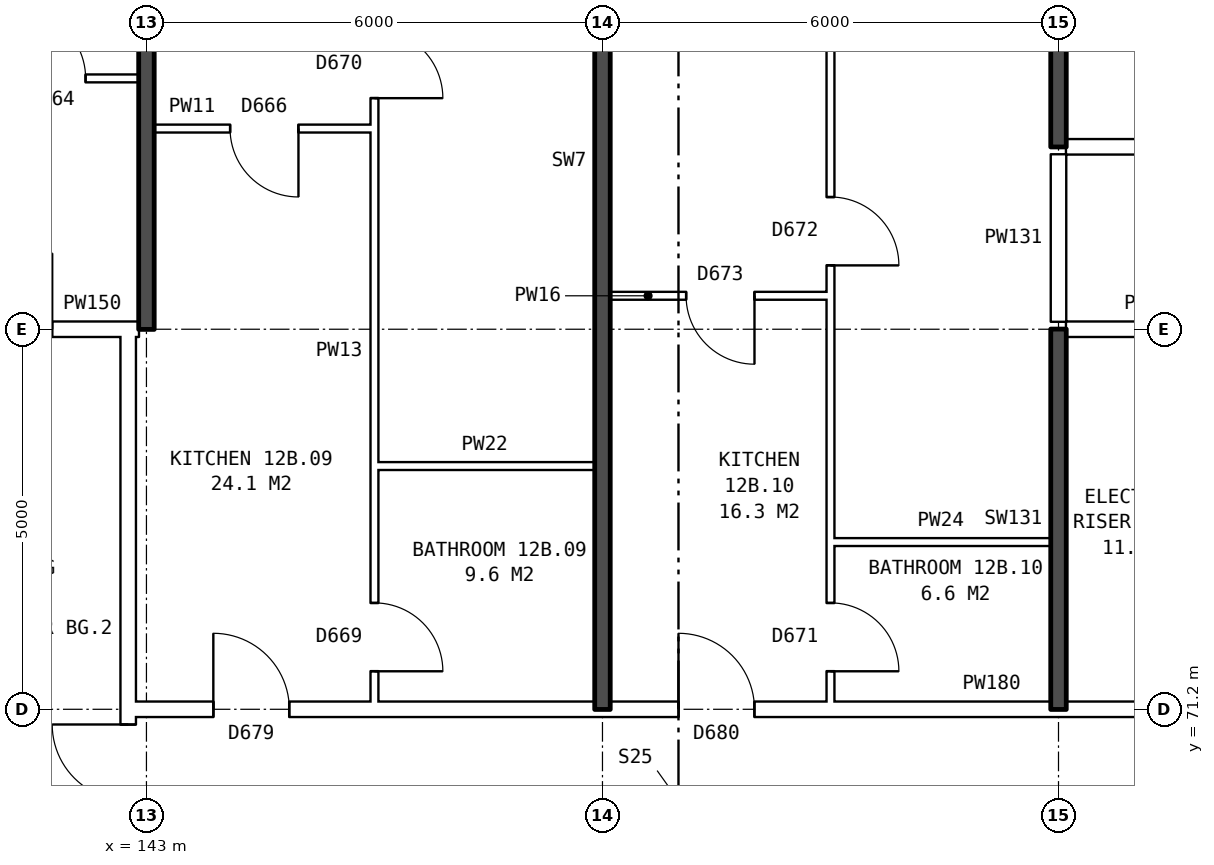
"""IFC4 building model, lengths in metres.
Left out: names, types, materials, properties, quantities, classifications, styles, units other than length and angle.
Written with IfcOpenShell. Run it as: python <this file> out.ifc"""

import sys

from ifc_helpers import new_model, si_unit, direction, frame, frame_2d, origin, place, context, subcontext, project, spatial, rectangle, extrude, element, fill, save


model = new_model("IFC4")
c1 = context("Model", 3, precision=1e-05, world=origin(), true_north=direction((0.0, 1.0)))
c2 = subcontext(c1, "Body", "Model", "MODEL_VIEW")
j1 = project(units=[si_unit("LENGTHUNIT", "METRE"), si_unit("PLANEANGLEUNIT", "RADIAN")], contexts=[c1])
p1 = place(None, origin())
s1 = spatial("IfcSite", under=j1, at=p1, CompositionType="ELEMENT")
p2 = place(p1, origin())
s2 = spatial("IfcBuilding", under=s1, at=p2, CompositionType="ELEMENT")
p3 = place(p2, frame((0.0, 0.0, 47.4)))
s3 = spatial("IfcBuildingStorey", under=s2, at=p3, CompositionType="ELEMENT", Elevation=47.4)
p4 = place(p3, frame((142.76, 63.9, 0.0), z_axis=(0.0, 0.0, 1.0), x_axis=(0.0, 1.0, 0.0)))
e1 = element("IfcWall", 1, at=p4, inside=s3, PredefinedType="PARTITIONING", context=c2, shape_type="SweptSolid", body=[
    extrude(rectangle(XDim=12.2, YDim=0.2, at=frame_2d((6.1, 0.0))), origin(), (0.0, 0.0, 1.0), 2.85),
])
p5 = place(p4, frame((5.1, 0.0, 0.0)))
e2 = element("IfcOpeningElement", 2, at=p5, cuts=e1, PredefinedType="OPENING", context=c2, shape_type="SweptSolid", body=[
    extrude(rectangle(XDim=2.0, YDim=2.1, at=frame_2d((1.0, 1.05))), frame((0.0, 0.11, 0.0), z_axis=(0.0, -1.0, 0.0), x_axis=(1.0, 0.0, 0.0)), (0.0, 0.0, 1.0), 0.22),
])
p6 = place(p3, frame((142.76, 71.2, 0.0), z_axis=(0.0, 0.0, 1.0), x_axis=(1.0, 0.0, 0.0)))
e3 = element("IfcWall", 3, at=p6, inside=s3, PredefinedType="PARTITIONING", context=c2, shape_type="SweptSolid", body=[
    extrude(rectangle(XDim=14.48, YDim=0.2, at=frame_2d((7.24, 0.0))), origin(), (0.0, 0.0, 1.0), 2.85),
])
p7 = place(p6, frame((1.12, 0.0, 0.0)))
e4 = element("IfcOpeningElement", 4, at=p7, cuts=e3, PredefinedType="OPENING", context=c2, shape_type="SweptSolid", body=[
    extrude(rectangle(XDim=1.0, YDim=2.1, at=frame_2d((0.5, 1.05))), frame((0.0, 0.11, 0.0), z_axis=(0.0, -1.0, 0.0), x_axis=(1.0, 0.0, 0.0)), (0.0, 0.0, 1.0), 0.22),
])
p8 = place(p6, frame((7.24, 0.0, 0.0)))
e5 = element("IfcOpeningElement", 5, at=p8, cuts=e3, PredefinedType="OPENING", context=c2, shape_type="SweptSolid", body=[
    extrude(rectangle(XDim=1.0, YDim=2.1, at=frame_2d((0.5, 1.05))), frame((0.0, 0.11, 0.0), z_axis=(0.0, -1.0, 0.0), x_axis=(1.0, 0.0, 0.0)), (0.0, 0.0, 1.0), 0.22),
])
for number, where, z_axis, x_axis in (
    (6, (152.0, 73.4, 0.0), (0.0, 0.0, 1.0), (1.0, 0.0, 0.0)),
    (7, (146.0, 74.4, 0.0), (0.0, 0.0, 1.0), (1.0, 0.0, 0.0)),
):
    element("IfcWall", number, at=place(p3, frame(where, z_axis=z_axis, x_axis=x_axis)), inside=s3, PredefinedType="PARTITIONING", context=c2, shape_type="SweptSolid", body=[
        extrude(rectangle(XDim=2.9, YDim=0.1, at=frame_2d((1.45, 0.0))), origin(), (0.0, 0.0, 1.0), 2.85),
    ])
p9 = place(p3, frame((139.76, 76.2, 0.0), z_axis=(0.0, 0.0, 1.0), x_axis=(1.0, 0.0, 0.0)))
e8 = element("IfcWall", 8, at=p9, inside=s3, PredefinedType="PARTITIONING", context=c2, shape_type="SweptSolid", body=[
    extrude(rectangle(XDim=3.0, YDim=0.2, at=frame_2d((1.5, 0.0))), origin(), (0.0, 0.0, 1.0), 2.85),
])
p10 = place(p9, frame((1.0, 0.0, 0.0)))
e9 = element("IfcOpeningElement", 9, at=p10, cuts=e8, PredefinedType="OPENING", context=c2, shape_type="SweptSolid", body=[
    extrude(rectangle(XDim=1.0, YDim=2.1, at=frame_2d((0.5, 1.05))), frame((0.0, 0.11, 0.0), z_axis=(0.0, -1.0, 0.0), x_axis=(1.0, 0.0, 0.0)), (0.0, 0.0, 1.0), 0.22),
])
p11 = place(p3, frame((142.76, 76.2, 0.0), z_axis=(0.0, 0.0, 1.0), x_axis=(1.0, 0.0, 0.0)))
e10 = element("IfcWall", 10, at=p11, inside=s3, PredefinedType="PARTITIONING", context=c2, shape_type="SweptSolid", body=[
    extrude(rectangle(XDim=0.14, YDim=0.2, at=frame_2d((0.07, 0.0))), origin(), (0.0, 0.0, 1.0), 2.85),
])
p12 = place(p3, frame((155.1, 76.2, 0.0), z_axis=(0.0, 0.0, 1.0), x_axis=(1.0, 0.0, 0.0)))
e11 = element("IfcWall", 11, at=p12, inside=s3, PredefinedType="PARTITIONING", context=c2, shape_type="SweptSolid", body=[
    extrude(rectangle(XDim=2.14, YDim=0.2, at=frame_2d((1.07, 0.0))), origin(), (0.0, 0.0, 1.0), 2.85),
])
p13 = place(p3, frame((149.1, 76.64, 0.0), z_axis=(0.0, 0.0, 1.0), x_axis=(1.0, 0.0, 0.0)))
e12 = element("IfcWall", 12, at=p13, inside=s3, PredefinedType="PARTITIONING", context=c2, shape_type="SweptSolid", body=[
    extrude(rectangle(XDim=2.9, YDim=0.1, at=frame_2d((1.45, 0.0))), origin(), (0.0, 0.0, 1.0), 2.85),
])
p14 = place(p13, frame((1.0, 0.0, 0.0)))
e13 = element("IfcOpeningElement", 13, at=p14, cuts=e12, PredefinedType="OPENING", context=c2, shape_type="SweptSolid", body=[
    extrude(rectangle(XDim=0.9, YDim=2.1, at=frame_2d((0.45, 1.05))), frame((0.0, 0.06, 0.0), z_axis=(0.0, -1.0, 0.0), x_axis=(1.0, 0.0, 0.0)), (0.0, 0.0, 1.0), 0.12),
])
p15 = place(p3, frame((155.1, 78.6, 0.0), z_axis=(0.0, 0.0, 1.0), x_axis=(1.0, 0.0, 0.0)))
e14 = element("IfcWall", 14, at=p15, inside=s3, PredefinedType="PARTITIONING", context=c2, shape_type="SweptSolid", body=[
    extrude(rectangle(XDim=21.04, YDim=0.2, at=frame_2d((10.52, 0.0))), origin(), (0.0, 0.0, 1.0), 2.85),
])
p16 = place(p15, frame((2.45, 0.0, 0.0)))
e15 = element("IfcOpeningElement", 15, at=p16, cuts=e14, PredefinedType="OPENING", context=c2, shape_type="SweptSolid", body=[
    extrude(rectangle(XDim=1.0, YDim=2.1, at=frame_2d((0.5, 1.05))), frame((0.0, 0.11, 0.0), z_axis=(0.0, -1.0, 0.0), x_axis=(1.0, 0.0, 0.0)), (0.0, 0.0, 1.0), 0.22),
])
p17 = place(p15, frame((14.4, 0.0, 0.0)))
e16 = element("IfcOpeningElement", 16, at=p17, cuts=e14, PredefinedType="OPENING", context=c2, shape_type="SweptSolid", body=[
    extrude(rectangle(XDim=1.0, YDim=2.1, at=frame_2d((0.5, 1.05))), frame((0.0, 0.11, 0.0), z_axis=(0.0, -1.0, 0.0), x_axis=(1.0, 0.0, 0.0)), (0.0, 0.0, 1.0), 0.22),
])
p18 = place(p3, frame((143.1, 78.84, 0.0), z_axis=(0.0, 0.0, 1.0), x_axis=(1.0, 0.0, 0.0)))
e17 = element("IfcWall", 17, at=p18, inside=s3, PredefinedType="PARTITIONING", context=c2, shape_type="SweptSolid", body=[
    extrude(rectangle(XDim=2.9, YDim=0.1, at=frame_2d((1.45, 0.0))), origin(), (0.0, 0.0, 1.0), 2.85),
])
p19 = place(p18, frame((1.0, 0.0, 0.0)))
e18 = element("IfcOpeningElement", 18, at=p19, cuts=e17, PredefinedType="OPENING", context=c2, shape_type="SweptSolid", body=[
    extrude(rectangle(XDim=0.9, YDim=2.1, at=frame_2d((0.45, 1.05))), frame((0.0, 0.06, 0.0), z_axis=(0.0, -1.0, 0.0), x_axis=(1.0, 0.0, 0.0)), (0.0, 0.0, 1.0), 0.12),
])
p20 = place(p3, frame((137.1, 79.5, 0.0), z_axis=(0.0, 0.0, 1.0), x_axis=(1.0, 0.0, 0.0)))
e19 = element("IfcWall", 19, at=p20, inside=s3, PredefinedType="PARTITIONING", context=c2, shape_type="SweptSolid", body=[
    extrude(rectangle(XDim=5.8, YDim=0.1, at=frame_2d((2.9, 0.0))), origin(), (0.0, 0.0, 1.0), 2.85),
])
p21 = place(p20, frame((1.3, 0.0, 0.0)))
e20 = element("IfcOpeningElement", 20, at=p21, cuts=e19, PredefinedType="OPENING", context=c2, shape_type="SweptSolid", body=[
    extrude(rectangle(XDim=0.9, YDim=2.1, at=frame_2d((0.45, 1.05))), frame((0.0, 0.06, 0.0), z_axis=(0.0, -1.0, 0.0), x_axis=(1.0, 0.0, 0.0)), (0.0, 0.0, 1.0), 0.12),
])
p22 = place(p20, frame((4.2, 0.0, 0.0)))
e21 = element("IfcOpeningElement", 21, at=p22, cuts=e19, PredefinedType="OPENING", context=c2, shape_type="SweptSolid", body=[
    extrude(rectangle(XDim=0.9, YDim=2.1, at=frame_2d((0.45, 1.05))), frame((0.0, 0.06, 0.0), z_axis=(0.0, -1.0, 0.0), x_axis=(1.0, 0.0, 0.0)), (0.0, 0.0, 1.0), 0.12),
])
p23 = place(p3, frame((143.0, 76.2, 0.0), z_axis=(0.0, 0.0, 1.0), x_axis=(0.0, 1.0, 0.0)))
e22 = element("IfcWall", 22, at=p23, inside=s3, PredefinedType="SOLIDWALL", context=c2, shape_type="SweptSolid", body=[
    extrude(rectangle(XDim=9.44, YDim=0.2, at=frame_2d((4.72, 0.0))), origin(), (0.0, 0.0, 1.0), 2.85),
])
p24 = place(p3, frame((146.0, 71.3, 0.0), z_axis=(0.0, 0.0, 1.0), x_axis=(0.0, 1.0, 0.0)))
e23 = element("IfcWall", 23, at=p24, inside=s3, PredefinedType="PARTITIONING", context=c2, shape_type="SweptSolid", body=[
    extrude(rectangle(XDim=14.34, YDim=0.1, at=frame_2d((7.17, 0.0))), origin(), (0.0, 0.0, 1.0), 2.85),
])
p25 = place(p24, frame((7.94, 0.0, 0.0)))
e24 = element("IfcOpeningElement", 24, at=p25, cuts=e23, PredefinedType="OPENING", context=c2, shape_type="SweptSolid", body=[
    extrude(rectangle(XDim=0.9, YDim=2.1, at=frame_2d((0.45, 1.05))), frame((0.0, 0.06, 0.0), z_axis=(0.0, -1.0, 0.0), x_axis=(1.0, 0.0, 0.0)), (0.0, 0.0, 1.0), 0.12),
])
p26 = place(p24, frame((0.4, 0.0, 0.0)))
e25 = element("IfcOpeningElement", 25, at=p26, cuts=e23, PredefinedType="OPENING", context=c2, shape_type="SweptSolid", body=[
    extrude(rectangle(XDim=0.9, YDim=2.1, at=frame_2d((0.45, 1.05))), frame((0.0, 0.06, 0.0), z_axis=(0.0, -1.0, 0.0), x_axis=(1.0, 0.0, 0.0)), (0.0, 0.0, 1.0), 0.12),
])
p27 = place(p3, frame((149.0, 71.2, 0.0), z_axis=(0.0, 0.0, 1.0), x_axis=(0.0, 1.0, 0.0)))
e26 = element("IfcWall", 26, at=p27, inside=s3, PredefinedType="SOLIDWALL", context=c2, shape_type="SweptSolid", body=[
    extrude(rectangle(XDim=14.44, YDim=0.2, at=frame_2d((7.22, 0.0))), origin(), (0.0, 0.0, 1.0), 2.85),
])
p28 = place(p3, frame((152.0, 71.3, 0.0), z_axis=(0.0, 0.0, 1.0), x_axis=(0.0, 1.0, 0.0)))
e27 = element("IfcWall", 27, at=p28, inside=s3, PredefinedType="PARTITIONING", context=c2, shape_type="SweptSolid", body=[
    extrude(rectangle(XDim=14.34, YDim=0.1, at=frame_2d((7.17, 0.0))), origin(), (0.0, 0.0, 1.0), 2.85),
])
p29 = place(p28, frame((5.74, 0.0, 0.0)))
e28 = element("IfcOpeningElement", 28, at=p29, cuts=e27, PredefinedType="OPENING", context=c2, shape_type="SweptSolid", body=[
    extrude(rectangle(XDim=0.9, YDim=2.1, at=frame_2d((0.45, 1.05))), frame((0.0, 0.06, 0.0), z_axis=(0.0, -1.0, 0.0), x_axis=(1.0, 0.0, 0.0)), (0.0, 0.0, 1.0), 0.12),
])
p30 = place(p28, frame((0.4, 0.0, 0.0)))
e29 = element("IfcOpeningElement", 29, at=p30, cuts=e27, PredefinedType="OPENING", context=c2, shape_type="SweptSolid", body=[
    extrude(rectangle(XDim=0.9, YDim=2.1, at=frame_2d((0.45, 1.05))), frame((0.0, 0.06, 0.0), z_axis=(0.0, -1.0, 0.0), x_axis=(1.0, 0.0, 0.0)), (0.0, 0.0, 1.0), 0.12),
])
p31 = place(p3, frame((155.0, 71.2, 0.0), z_axis=(0.0, 0.0, 1.0), x_axis=(0.0, 1.0, 0.0)))
e30 = element("IfcWall", 30, at=p31, inside=s3, PredefinedType="SOLIDWALL", context=c2, shape_type="SweptSolid", body=[
    extrude(rectangle(XDim=5.0, YDim=0.2, at=frame_2d((2.5, 0.0))), origin(), (0.0, 0.0, 1.0), 2.85),
])
p32 = place(p3, frame((155.0, 76.3, 0.0), z_axis=(0.0, 0.0, 1.0), x_axis=(0.0, 1.0, 0.0)))
e31 = element("IfcWall", 31, at=p32, inside=s3, PredefinedType="PARTITIONING", context=c2, shape_type="SweptSolid", body=[
    extrude(rectangle(XDim=2.2, YDim=0.2, at=frame_2d((1.1, 0.0))), origin(), (0.0, 0.0, 1.0), 2.85),
])
p33 = place(p3, frame((155.0, 78.6, 0.0), z_axis=(0.0, 0.0, 1.0), x_axis=(0.0, 1.0, 0.0)))
e32 = element("IfcWall", 32, at=p33, inside=s3, PredefinedType="SOLIDWALL", context=c2, shape_type="SweptSolid", body=[
    extrude(rectangle(XDim=7.04, YDim=0.2, at=frame_2d((3.52, 0.0))), origin(), (0.0, 0.0, 1.0), 2.85),
])
p34 = place(p5, origin())
e33 = element("IfcDoor", 33, at=p34, inside=s3, OperationType="DOUBLE_DOOR_SINGLE_SWING", PredefinedType="DOOR", context=c2, shape_type="SweptSolid", body=[
    extrude(rectangle(XDim=2.0, YDim=2.1, at=frame_2d((1.0, 1.05))), frame((0.0, 0.025, 0.0), z_axis=(0.0, -1.0, 0.0), x_axis=(1.0, 0.0, 0.0)), (0.0, 0.0, 1.0), 0.05),
])
fill(e2, e33)
p35 = place(p22, origin())
e34 = element("IfcDoor", 34, at=p35, inside=s3, OperationType="SINGLE_SWING_LEFT", PredefinedType="DOOR", context=c2, shape_type="SweptSolid", body=[
    extrude(rectangle(XDim=0.9, YDim=2.1, at=frame_2d((0.45, 1.05))), frame((0.0, 0.025, 0.0), z_axis=(0.0, -1.0, 0.0), x_axis=(1.0, 0.0, 0.0)), (0.0, 0.0, 1.0), 0.05),
])
fill(e21, e34)
p36 = place(p25, frame((0.9, 0.0, 0.0), z_axis=(0.0, 0.0, 1.0), x_axis=(-1.0, 0.0, 0.0)))
e35 = element("IfcDoor", 35, at=p36, inside=s3, OperationType="SINGLE_SWING_RIGHT", PredefinedType="DOOR", context=c2, shape_type="SweptSolid", body=[
    extrude(rectangle(XDim=0.9, YDim=2.1, at=frame_2d((0.45, 1.05))), frame((0.0, 0.025, 0.0), z_axis=(0.0, -1.0, 0.0), x_axis=(1.0, 0.0, 0.0)), (0.0, 0.0, 1.0), 0.05),
])
fill(e24, e35)
p37 = place(p7, origin())
e36 = element("IfcDoor", 36, at=p37, inside=s3, OperationType="SINGLE_SWING_LEFT", PredefinedType="DOOR", context=c2, shape_type="SweptSolid", body=[
    extrude(rectangle(XDim=1.0, YDim=2.1, at=frame_2d((0.5, 1.05))), frame((0.0, 0.025, 0.0), z_axis=(0.0, -1.0, 0.0), x_axis=(1.0, 0.0, 0.0)), (0.0, 0.0, 1.0), 0.05),
])
fill(e4, e36)
p38 = place(p19, frame((0.9, 0.0, 0.0), z_axis=(0.0, 0.0, 1.0), x_axis=(-1.0, 0.0, 0.0)))
e37 = element("IfcDoor", 37, at=p38, inside=s3, OperationType="SINGLE_SWING_LEFT", PredefinedType="DOOR", context=c2, shape_type="SweptSolid", body=[
    extrude(rectangle(XDim=0.9, YDim=2.1, at=frame_2d((0.45, 1.05))), frame((0.0, 0.025, 0.0), z_axis=(0.0, -1.0, 0.0), x_axis=(1.0, 0.0, 0.0)), (0.0, 0.0, 1.0), 0.05),
])
fill(e18, e37)
p39 = place(p26, frame((0.9, 0.0, 0.0), z_axis=(0.0, 0.0, 1.0), x_axis=(-1.0, 0.0, 0.0)))
e38 = element("IfcDoor", 38, at=p39, inside=s3, OperationType="SINGLE_SWING_RIGHT", PredefinedType="DOOR", context=c2, shape_type="SweptSolid", body=[
    extrude(rectangle(XDim=0.9, YDim=2.1, at=frame_2d((0.45, 1.05))), frame((0.0, 0.025, 0.0), z_axis=(0.0, -1.0, 0.0), x_axis=(1.0, 0.0, 0.0)), (0.0, 0.0, 1.0), 0.05),
])
fill(e25, e38)
p40 = place(p29, frame((0.9, 0.0, 0.0), z_axis=(0.0, 0.0, 1.0), x_axis=(-1.0, 0.0, 0.0)))
e39 = element("IfcDoor", 39, at=p40, inside=s3, OperationType="SINGLE_SWING_RIGHT", PredefinedType="DOOR", context=c2, shape_type="SweptSolid", body=[
    extrude(rectangle(XDim=0.9, YDim=2.1, at=frame_2d((0.45, 1.05))), frame((0.0, 0.025, 0.0), z_axis=(0.0, -1.0, 0.0), x_axis=(1.0, 0.0, 0.0)), (0.0, 0.0, 1.0), 0.05),
])
fill(e28, e39)
p41 = place(p8, origin())
e40 = element("IfcDoor", 40, at=p41, inside=s3, OperationType="SINGLE_SWING_LEFT", PredefinedType="DOOR", context=c2, shape_type="SweptSolid", body=[
    extrude(rectangle(XDim=1.0, YDim=2.1, at=frame_2d((0.5, 1.05))), frame((0.0, 0.025, 0.0), z_axis=(0.0, -1.0, 0.0), x_axis=(1.0, 0.0, 0.0)), (0.0, 0.0, 1.0), 0.05),
])
fill(e5, e40)
p42 = place(p14, frame((0.9, 0.0, 0.0), z_axis=(0.0, 0.0, 1.0), x_axis=(-1.0, 0.0, 0.0)))
e41 = element("IfcDoor", 41, at=p42, inside=s3, OperationType="SINGLE_SWING_LEFT", PredefinedType="DOOR", context=c2, shape_type="SweptSolid", body=[
    extrude(rectangle(XDim=0.9, YDim=2.1, at=frame_2d((0.45, 1.05))), frame((0.0, 0.025, 0.0), z_axis=(0.0, -1.0, 0.0), x_axis=(1.0, 0.0, 0.0)), (0.0, 0.0, 1.0), 0.05),
])
fill(e13, e41)
p43 = place(p30, frame((0.9, 0.0, 0.0), z_axis=(0.0, 0.0, 1.0), x_axis=(-1.0, 0.0, 0.0)))
e42 = element("IfcDoor", 42, at=p43, inside=s3, OperationType="SINGLE_SWING_RIGHT", PredefinedType="DOOR", context=c2, shape_type="SweptSolid", body=[
    extrude(rectangle(XDim=0.9, YDim=2.1, at=frame_2d((0.45, 1.05))), frame((0.0, 0.025, 0.0), z_axis=(0.0, -1.0, 0.0), x_axis=(1.0, 0.0, 0.0)), (0.0, 0.0, 1.0), 0.05),
])
fill(e29, e42)
save(model, sys.argv[1])
